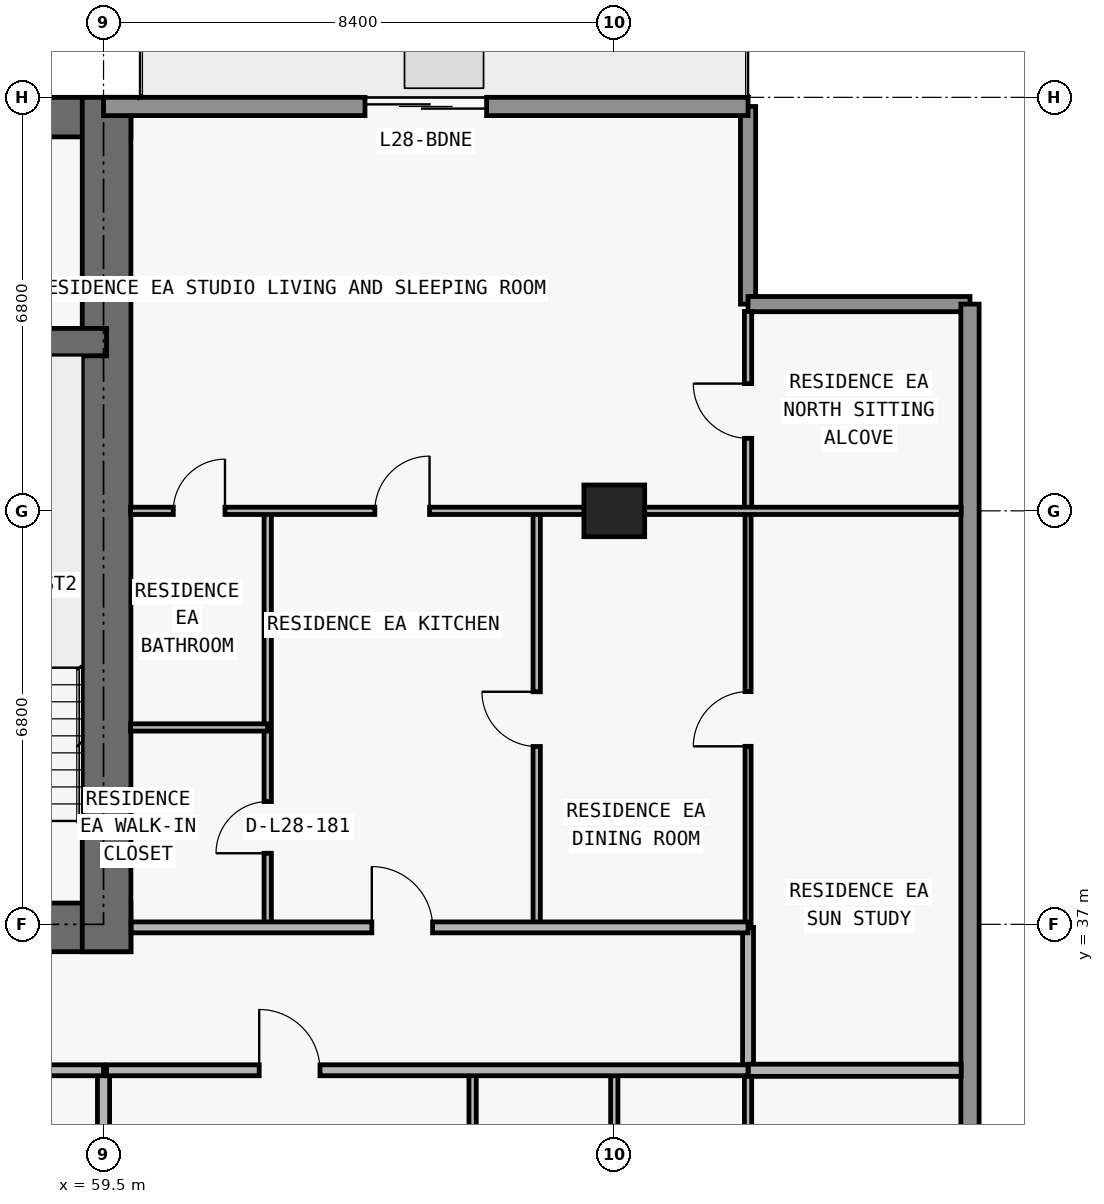
"""IFC4 building model, lengths in metres.
Left out: names, types, materials, properties, quantities, classifications, styles, units other than length and angle.
Written with IfcOpenShell. Run it as: python <this file> out.ifc"""

import sys

from ifc_helpers import new_model, si_unit, direction, frame, frame_2d, origin, origin_2d, place, context, subcontext, project, spatial, rectangle, extrude, element, fill, save


model = new_model("IFC4")
c1 = context("Model", 3, precision=1e-05, world=origin(), true_north=direction((0.0, 1.0)))
c2 = subcontext(c1, "Body", "Model", "MODEL_VIEW")
j1 = project(units=[si_unit("LENGTHUNIT", "METRE"), si_unit("PLANEANGLEUNIT", "RADIAN")], contexts=[c1])
p1 = place(None, origin())
s1 = spatial("IfcSite", under=j1, at=p1, CompositionType="ELEMENT")
p2 = place(p1, origin())
s2 = spatial("IfcBuilding", under=s1, at=p2, CompositionType="ELEMENT")
p3 = place(p2, frame((0.0, 0.0, 105.9)))
s3 = spatial("IfcBuildingStorey", under=s2, at=p3, CompositionType="ELEMENT", Elevation=105.9)
p4 = place(p3, frame((67.9, 43.8, 0.0), z_axis=(0.0, 0.0, 1.0), x_axis=(1.0, 0.0, 0.0)))
e1 = element("IfcColumn", 1, at=p4, inside=s3, PredefinedType="COLUMN", context=c2, shape_type="SweptSolid", body=[
    extrude(rectangle(XDim=1.0, YDim=0.85, at=origin_2d()), origin(), (0.0, 0.0, 1.0), 3.05),
])
p5 = place(p3, frame((17.85, 36.95, 0.0), z_axis=(0.0, 0.0, 1.0), x_axis=(1.0, 0.0, 0.0)))
e2 = element("IfcWall", 2, at=p5, inside=s3, PredefinedType="SHEAR", context=c2, shape_type="SweptSolid", body=[
    extrude(rectangle(XDim=42.1, YDim=0.8, at=frame_2d((21.05, 0.0))), origin(), (0.0, 0.0, 1.0), 3.05),
])
p6 = place(p5, frame((14.45, 0.0, 0.0)))
e3 = element("IfcOpeningElement", 3, at=p6, cuts=e2, PredefinedType="OPENING", context=c2, shape_type="SweptSolid", body=[
    extrude(rectangle(XDim=1.1, YDim=2.15, at=frame_2d((0.55, 1.075))), frame((0.0, 0.41, 0.0), z_axis=(0.0, -1.0, 0.0), x_axis=(1.0, 0.0, 0.0)), (0.0, 0.0, 1.0), 0.82),
])
p7 = place(p5, frame((6.3, 0.0, 0.0)))
e4 = element("IfcOpeningElement", 4, at=p7, cuts=e2, PredefinedType="OPENING", context=c2, shape_type="SweptSolid", body=[
    extrude(rectangle(XDim=1.05, YDim=2.15, at=frame_2d((0.525, 1.075))), frame((0.0, 0.41, 0.0), z_axis=(0.0, -1.0, 0.0), x_axis=(1.0, 0.0, 0.0)), (0.0, 0.0, 1.0), 0.82),
])
p8 = place(p5, frame((34.8, 0.0, 0.0)))
e5 = element("IfcOpeningElement", 5, at=p8, cuts=e2, PredefinedType="OPENING", context=c2, shape_type="SweptSolid", body=[
    extrude(rectangle(XDim=1.05, YDim=2.15, at=frame_2d((0.525, 1.075))), frame((0.0, 0.41, 0.0), z_axis=(0.0, -1.0, 0.0), x_axis=(1.0, 0.0, 0.0)), (0.0, 0.0, 1.0), 0.82),
])
p9 = place(p5, frame((10.913, 0.0, 0.0)))
e6 = element("IfcOpeningElement", 6, at=p9, cuts=e2, PredefinedType="OPENING", context=c2, shape_type="SweptSolid", body=[
    extrude(rectangle(XDim=1.05, YDim=2.15, at=frame_2d((0.525, 1.075))), frame((0.0, 0.41, 0.0), z_axis=(0.0, -1.0, 0.0), x_axis=(1.0, 0.0, 0.0)), (0.0, 0.0, 1.0), 0.82),
])
p10 = place(p5, frame((24.15, 0.0, 0.0)))
e7 = element("IfcOpeningElement", 7, at=p10, cuts=e2, PredefinedType="OPENING", context=c2, shape_type="SweptSolid", body=[
    extrude(rectangle(XDim=1.05, YDim=2.15, at=frame_2d((0.525, 1.075))), frame((0.0, 0.41, 0.0), z_axis=(0.0, -1.0, 0.0), x_axis=(1.0, 0.0, 0.0)), (0.0, 0.0, 1.0), 0.82),
])
p11 = place(p3, frame((17.85, 50.275, 0.0), z_axis=(0.0, 0.0, 1.0), x_axis=(1.0, 0.0, 0.0)))
e8 = element("IfcWall", 8, at=p11, inside=s3, PredefinedType="SHEAR", context=c2, shape_type="SweptSolid", body=[
    extrude(rectangle(XDim=42.1, YDim=0.65, at=frame_2d((21.05, 0.0))), origin(), (0.0, 0.0, 1.0), 3.05),
])
p12 = place(p3, frame((59.55, 36.55, 0.0), z_axis=(0.0, 0.0, 1.0), x_axis=(0.0, 1.0, 0.0)))
e9 = element("IfcWall", 9, at=p12, inside=s3, PredefinedType="SHEAR", context=c2, shape_type="SweptSolid", body=[
    extrude(rectangle(XDim=14.05, YDim=0.8, at=frame_2d((7.025, 0.0))), origin(), (0.0, 0.0, 1.0), 3.05),
])
p13 = place(p3, frame((18.25, 46.575, 0.0), z_axis=(0.0, 0.0, 1.0), x_axis=(1.0, 0.0, 0.0)))
e10 = element("IfcWall", 10, at=p13, inside=s3, PredefinedType="SHEAR", context=c2, shape_type="SweptSolid", body=[
    extrude(rectangle(XDim=41.3, YDim=0.45, at=frame_2d((20.65, 0.0))), origin(), (0.0, 0.0, 1.0), 3.05),
])
p14 = place(p13, frame((7.625, 0.0, 0.0)))
e11 = element("IfcOpeningElement", 11, at=p14, cuts=e10, PredefinedType="OPENING", context=c2, shape_type="SweptSolid", body=[
    extrude(rectangle(XDim=1.05, YDim=2.15, at=frame_2d((0.525, 1.075))), frame((0.0, 0.235, 0.0), z_axis=(0.0, -1.0, 0.0), x_axis=(1.0, 0.0, 0.0)), (0.0, 0.0, 1.0), 0.47),
])
p15 = place(p13, frame((32.675, 0.0, 0.0)))
e12 = element("IfcOpeningElement", 12, at=p15, cuts=e10, PredefinedType="OPENING", context=c2, shape_type="SweptSolid", body=[
    extrude(rectangle(XDim=1.05, YDim=2.15, at=frame_2d((0.525, 1.075))), frame((0.0, 0.235, 0.0), z_axis=(0.0, -1.0, 0.0), x_axis=(1.0, 0.0, 0.0)), (0.0, 0.0, 1.0), 0.47),
])
p16 = place(p3, frame((70.1, 50.45, 0.0), z_axis=(0.0, 0.0, 1.0), x_axis=(0.0, -1.0, 0.0)))
e13 = element("IfcWall", 13, at=p16, inside=s3, PredefinedType="ELEMENTEDWALL", context=c2, shape_type="SweptSolid", body=[
    extrude(rectangle(XDim=3.25, YDim=0.25, at=frame_2d((1.625, 0.0))), origin(), (0.0, 0.0, 1.0), 3.05),
])
p17 = place(p3, frame((70.1, 47.2, 0.0), z_axis=(0.0, 0.0, 1.0), x_axis=(1.0, 0.0, 0.0)))
e14 = element("IfcWall", 14, at=p17, inside=s3, PredefinedType="ELEMENTEDWALL", context=c2, shape_type="SweptSolid", body=[
    extrude(rectangle(XDim=3.65, YDim=0.25, at=frame_2d((1.825, 0.0))), origin(), (0.0, 0.0, 1.0), 3.05),
])
p18 = place(p3, frame((73.75, 47.2, 0.0), z_axis=(0.0, 0.0, 1.0), x_axis=(0.0, -1.0, 0.0)))
e15 = element("IfcWall", 15, at=p18, inside=s3, PredefinedType="STANDARD", context=c2, shape_type="SweptSolid", body=[
    extrude(rectangle(XDim=19.2, YDim=0.3, at=frame_2d((9.6, 0.0))), origin(), (0.0, 0.0, 1.0), 3.05),
])
p19 = place(p3, frame((59.5, 50.45, 0.0), z_axis=(0.0, 0.0, 1.0), x_axis=(1.0, 0.0, 0.0)))
e16 = element("IfcWall", 16, at=p19, inside=s3, PredefinedType="STANDARD", context=c2, shape_type="SweptSolid", body=[
    extrude(rectangle(XDim=10.6, YDim=0.3, at=frame_2d((5.3, 0.0))), origin(), (0.0, 0.0, 1.0), 3.05),
])
p20 = place(p19, frame((4.3, 0.0, 0.0)))
e17 = element("IfcOpeningElement", 17, at=p20, cuts=e16, PredefinedType="OPENING", context=c2, shape_type="SweptSolid", body=[
    extrude(rectangle(XDim=2.0, YDim=2.3, at=frame_2d((1.0, 1.15))), frame((0.0, 0.16, 0.0), z_axis=(0.0, -1.0, 0.0), x_axis=(1.0, 0.0, 0.0)), (0.0, 0.0, 1.0), 0.32),
])
p21 = place(p3, frame((59.5, 30.24, 0.0), z_axis=(0.0, 0.0, 1.0), x_axis=(0.0, 1.0, 0.0)))
e18 = element("IfcWall", 18, at=p21, inside=s3, PredefinedType="PARTITIONING", context=c2, shape_type="SweptSolid", body=[
    extrude(rectangle(XDim=4.36, YDim=0.2, at=frame_2d((2.18, 0.0))), origin(), (0.0, 0.0, 1.0), 2.174),
])
p22 = place(p3, frame((62.2, 36.95, 0.0), z_axis=(0.0, 0.0, 1.0), x_axis=(0.0, 1.0, 0.0)))
e19 = element("IfcWall", 19, at=p22, inside=s3, PredefinedType="PARTITIONING", context=c2, shape_type="SweptSolid", body=[
    extrude(rectangle(XDim=6.85, YDim=0.12, at=frame_2d((3.425, 0.0))), origin(), (0.0, 0.0, 1.0), 2.499),
])
p23 = place(p22, frame((1.219, 0.0, 0.0)))
e20 = element("IfcOpeningElement", 20, at=p23, cuts=e19, PredefinedType="OPENING", context=c2, shape_type="SweptSolid", body=[
    extrude(rectangle(XDim=0.85, YDim=2.1, at=frame_2d((0.425, 1.05))), frame((0.0, 0.07, 0.0), z_axis=(0.0, -1.0, 0.0), x_axis=(1.0, 0.0, 0.0)), (0.0, 0.0, 1.0), 0.14),
])
p24 = place(p3, frame((65.57, 30.24, 0.0), z_axis=(0.0, 0.0, 1.0), x_axis=(0.0, 1.0, 0.0)))
e21 = element("IfcWall", 21, at=p24, inside=s3, PredefinedType="PARTITIONING", context=c2, shape_type="SweptSolid", body=[
    extrude(rectangle(XDim=4.36, YDim=0.12, at=frame_2d((2.18, 0.0))), origin(), (0.0, 0.0, 1.0), 3.05),
])
p25 = place(p24, frame((1.755, 0.0, 0.0)))
e22 = element("IfcOpeningElement", 22, at=p25, cuts=e21, PredefinedType="OPENING", context=c2, shape_type="SweptSolid", body=[
    extrude(rectangle(XDim=0.85, YDim=2.1, at=frame_2d((0.425, 1.05))), frame((0.0, 0.07, 0.0), z_axis=(0.0, -1.0, 0.0), x_axis=(1.0, 0.0, 0.0)), (0.0, 0.0, 1.0), 0.14),
])
p26 = place(p3, frame((66.624, 36.95, 0.0), z_axis=(0.0, 0.0, 1.0), x_axis=(0.0, 1.0, 0.0)))
e23 = element("IfcWall", 23, at=p26, inside=s3, PredefinedType="PARTITIONING", context=c2, shape_type="SweptSolid", body=[
    extrude(rectangle(XDim=6.85, YDim=0.12, at=frame_2d((3.425, 0.0))), origin(), (0.0, 0.0, 1.0), 3.05),
])
p27 = place(p26, frame((2.975, 0.0, 0.0)))
e24 = element("IfcOpeningElement", 24, at=p27, cuts=e23, PredefinedType="OPENING", context=c2, shape_type="SweptSolid", body=[
    extrude(rectangle(XDim=0.9, YDim=2.15, at=frame_2d((0.45, 1.075))), frame((0.0, 0.07, 0.0), z_axis=(0.0, -1.0, 0.0), x_axis=(1.0, 0.0, 0.0)), (0.0, 0.0, 1.0), 0.14),
])
p28 = place(p3, frame((67.9, 30.24, 0.0), z_axis=(0.0, 0.0, 1.0), x_axis=(0.0, 1.0, 0.0)))
e25 = element("IfcWall", 25, at=p28, inside=s3, PredefinedType="PARTITIONING", context=c2, shape_type="SweptSolid", body=[
    extrude(rectangle(XDim=4.36, YDim=0.12, at=frame_2d((2.18, 0.0))), origin(), (0.0, 0.0, 1.0), 2.174),
])
p29 = place(p3, frame((70.1, 30.24, 0.0), z_axis=(0.0, 0.0, 1.0), x_axis=(0.0, 1.0, 0.0)))
e26 = element("IfcWall", 26, at=p29, inside=s3, PredefinedType="PARTITIONING", context=c2, shape_type="SweptSolid", body=[
    extrude(rectangle(XDim=4.36, YDim=0.12, at=frame_2d((2.18, 0.0))), origin(), (0.0, 0.0, 1.0), 3.05),
])
p30 = place(p3, frame((70.1, 34.605, 0.0), z_axis=(0.0, 0.0, 1.0), x_axis=(0.0, 1.0, 0.0)))
e27 = element("IfcWall", 27, at=p30, inside=s3, PredefinedType="PARTITIONING", context=c2, shape_type="SweptSolid", body=[
    extrude(rectangle(XDim=2.345, YDim=0.18, at=frame_2d((1.172, 0.0))), origin(), (0.0, 0.0, 1.0), 3.05),
])
p31 = place(p3, frame((70.1, 36.955, 0.0), z_axis=(0.0, 0.0, 1.0), x_axis=(0.0, 1.0, 0.0)))
e28 = element("IfcWall", 28, at=p31, inside=s3, PredefinedType="MOVABLE", context=c2, shape_type="SweptSolid", body=[
    extrude(rectangle(XDim=6.845, YDim=0.1, at=frame_2d((3.422, 0.0))), origin(), (0.0, 0.0, 1.0), 3.05),
])
p32 = place(p31, frame((2.972, 0.0, 0.0)))
e29 = element("IfcOpeningElement", 29, at=p32, cuts=e28, PredefinedType="OPENING", context=c2, shape_type="SweptSolid", body=[
    extrude(rectangle(XDim=0.9, YDim=2.15, at=frame_2d((0.45, 1.075))), frame((0.0, 0.06, 0.0), z_axis=(0.0, -1.0, 0.0), x_axis=(1.0, 0.0, 0.0)), (0.0, 0.0, 1.0), 0.12),
])
p33 = place(p3, frame((70.1, 43.805, 0.0), z_axis=(0.0, 0.0, 1.0), x_axis=(0.0, 1.0, 0.0)))
e30 = element("IfcWall", 30, at=p33, inside=s3, PredefinedType="PARTITIONING", context=c2, shape_type="SweptSolid", body=[
    extrude(rectangle(XDim=3.275, YDim=0.12, at=frame_2d((1.638, 0.0))), origin(), (0.0, 0.0, 1.0), 3.05),
])
p34 = place(p33, frame((1.188, 0.0, 0.0)))
e31 = element("IfcOpeningElement", 31, at=p34, cuts=e30, PredefinedType="OPENING", context=c2, shape_type="SweptSolid", body=[
    extrude(rectangle(XDim=0.9, YDim=2.15, at=frame_2d((0.45, 1.075))), frame((0.0, 0.07, 0.0), z_axis=(0.0, -1.0, 0.0), x_axis=(1.0, 0.0, 0.0)), (0.0, 0.0, 1.0), 0.14),
])
p35 = place(p3, frame((26.7, 34.6, 0.0), z_axis=(0.0, 0.0, 1.0), x_axis=(1.0, 0.0, 0.0)))
e32 = element("IfcWall", 32, at=p35, inside=s3, PredefinedType="PARTITIONING", context=c2, shape_type="SweptSolid", body=[
    extrude(rectangle(XDim=32.8, YDim=0.18, at=frame_2d((16.4, 0.0))), origin(), (0.0, 0.0, 1.0), 3.05),
])
p36 = place(p35, frame((2.812, 0.0, 0.0)))
e33 = element("IfcOpeningElement", 33, at=p36, cuts=e32, PredefinedType="OPENING", context=c2, shape_type="SweptSolid", body=[
    extrude(rectangle(XDim=1.0, YDim=2.2, at=frame_2d((0.5, 1.1))), frame((0.0, 0.1, 0.0), z_axis=(0.0, -1.0, 0.0), x_axis=(1.0, 0.0, 0.0)), (0.0, 0.0, 1.0), 0.2),
])
p37 = place(p35, frame((27.104, 0.0, 0.0)))
e34 = element("IfcOpeningElement", 34, at=p37, cuts=e32, PredefinedType="OPENING", context=c2, shape_type="SweptSolid", body=[
    extrude(rectangle(XDim=1.0, YDim=2.2, at=frame_2d((0.5, 1.1))), frame((0.0, 0.1, 0.0), z_axis=(0.0, -1.0, 0.0), x_axis=(1.0, 0.0, 0.0)), (0.0, 0.0, 1.0), 0.2),
])
p38 = place(p3, frame((59.55, 34.6, 0.0), z_axis=(0.0, 0.0, 1.0), x_axis=(1.0, 0.0, 0.0)))
e35 = element("IfcWall", 35, at=p38, inside=s3, PredefinedType="PARTITIONING", context=c2, shape_type="SweptSolid", body=[
    extrude(rectangle(XDim=10.55, YDim=0.18, at=frame_2d((5.275, 0.0))), origin(), (0.0, 0.0, 1.0), 3.05),
])
p39 = place(p38, frame((2.51, 0.0, 0.0)))
e36 = element("IfcOpeningElement", 36, at=p39, cuts=e35, PredefinedType="OPENING", context=c2, shape_type="SweptSolid", body=[
    extrude(rectangle(XDim=1.0, YDim=2.2, at=frame_2d((0.5, 1.1))), frame((0.0, 0.1, 0.0), z_axis=(0.0, -1.0, 0.0), x_axis=(1.0, 0.0, 0.0)), (0.0, 0.0, 1.0), 0.2),
])
p40 = place(p3, frame((70.105, 34.6, 0.0), z_axis=(0.0, 0.0, 1.0), x_axis=(1.0, 0.0, 0.0)))
e37 = element("IfcWall", 37, at=p40, inside=s3, PredefinedType="PARTITIONING", context=c2, shape_type="SweptSolid", body=[
    extrude(rectangle(XDim=3.5, YDim=0.2, at=frame_2d((1.75, 0.0))), origin(), (0.0, 0.0, 1.0), 3.05),
])
p41 = place(p3, frame((59.955, 36.95, 0.0), z_axis=(0.0, 0.0, 1.0), x_axis=(1.0, 0.0, 0.0)))
e38 = element("IfcWall", 38, at=p41, inside=s3, PredefinedType="PARTITIONING", context=c2, shape_type="SweptSolid", body=[
    extrude(rectangle(XDim=10.145, YDim=0.18, at=frame_2d((5.073, 0.0))), origin(), (0.0, 0.0, 1.0), 3.05),
])
p42 = place(p41, frame((3.957, 0.0, 0.0)))
e39 = element("IfcOpeningElement", 39, at=p42, cuts=e38, PredefinedType="OPENING", context=c2, shape_type="SweptSolid", body=[
    extrude(rectangle(XDim=1.0, YDim=2.2, at=frame_2d((0.5, 1.1))), frame((0.0, 0.1, 0.0), z_axis=(0.0, -1.0, 0.0), x_axis=(1.0, 0.0, 0.0)), (0.0, 0.0, 1.0), 0.2),
])
p43 = place(p3, frame((59.945, 40.238, 0.0), z_axis=(0.0, 0.0, 1.0), x_axis=(1.0, 0.0, 0.0)))
e40 = element("IfcWall", 40, at=p43, inside=s3, PredefinedType="PARTITIONING", context=c2, shape_type="SweptSolid", body=[
    extrude(rectangle(XDim=2.255, YDim=0.12, at=frame_2d((1.127, 0.0))), origin(), (0.0, 0.0, 1.0), 3.05),
])
p44 = place(p3, frame((59.945, 43.8, 0.0), z_axis=(0.0, 0.0, 1.0), x_axis=(1.0, 0.0, 0.0)))
e41 = element("IfcWall", 41, at=p44, inside=s3, PredefinedType="PARTITIONING", context=c2, shape_type="SweptSolid", body=[
    extrude(rectangle(XDim=13.66, YDim=0.12, at=frame_2d((6.83, 0.0))), origin(), (0.0, 0.0, 1.0), 2.339),
])
p45 = place(p44, frame((4.017, 0.0, 0.0)))
e42 = element("IfcOpeningElement", 42, at=p45, cuts=e41, PredefinedType="OPENING", context=c2, shape_type="SweptSolid", body=[
    extrude(rectangle(XDim=0.9, YDim=2.15, at=frame_2d((0.45, 1.075))), frame((0.0, 0.07, 0.0), z_axis=(0.0, -1.0, 0.0), x_axis=(1.0, 0.0, 0.0)), (0.0, 0.0, 1.0), 0.14),
])
p46 = place(p44, frame((0.702, 0.0, 0.0)))
e43 = element("IfcOpeningElement", 43, at=p46, cuts=e41, PredefinedType="OPENING", context=c2, shape_type="SweptSolid", body=[
    extrude(rectangle(XDim=0.85, YDim=2.1, at=frame_2d((0.425, 1.05))), frame((0.0, 0.07, 0.0), z_axis=(0.0, -1.0, 0.0), x_axis=(1.0, 0.0, 0.0)), (0.0, 0.0, 1.0), 0.14),
])
p47 = place(p20, origin())
e44 = element("IfcDoor", 44, at=p47, inside=s3, OperationType="DOUBLE_DOOR_SLIDING", PredefinedType="DOOR", context=c2, shape_type="SweptSolid", body=[
    extrude(rectangle(XDim=2.0, YDim=2.3, at=frame_2d((1.0, 1.15))), frame((0.0, 0.025, 0.0), z_axis=(0.0, -1.0, 0.0), x_axis=(1.0, 0.0, 0.0)), (0.0, 0.0, 1.0), 0.05),
])
fill(e17, e44)
p48 = place(p39, origin())
e45 = element("IfcDoor", 45, at=p48, inside=s3, OperationType="SINGLE_SWING_LEFT", PredefinedType="DOOR", context=c2, shape_type="SweptSolid", body=[
    extrude(rectangle(XDim=1.0, YDim=2.2, at=frame_2d((0.5, 1.1))), frame((0.0, 0.025, 0.0), z_axis=(0.0, -1.0, 0.0), x_axis=(1.0, 0.0, 0.0)), (0.0, 0.0, 1.0), 0.05),
])
fill(e36, e45)
p49 = place(p27, origin())
e46 = element("IfcDoor", 46, at=p49, inside=s3, OperationType="SINGLE_SWING_RIGHT", PredefinedType="DOOR", context=c2, shape_type="SweptSolid", body=[
    extrude(rectangle(XDim=0.9, YDim=2.15, at=frame_2d((0.45, 1.075))), frame((0.0, 0.025, 0.0), z_axis=(0.0, -1.0, 0.0), x_axis=(1.0, 0.0, 0.0)), (0.0, 0.0, 1.0), 0.05),
])
fill(e24, e46)
p50 = place(p42, origin())
e47 = element("IfcDoor", 47, at=p50, inside=s3, OperationType="SINGLE_SWING_LEFT", PredefinedType="DOOR", context=c2, shape_type="SweptSolid", body=[
    extrude(rectangle(XDim=1.0, YDim=2.2, at=frame_2d((0.5, 1.1))), frame((0.0, 0.025, 0.0), z_axis=(0.0, -1.0, 0.0), x_axis=(1.0, 0.0, 0.0)), (0.0, 0.0, 1.0), 0.05),
])
fill(e39, e47)
p51 = place(p45, origin())
e48 = element("IfcDoor", 48, at=p51, inside=s3, OperationType="SINGLE_SWING_RIGHT", PredefinedType="DOOR", context=c2, shape_type="SweptSolid", body=[
    extrude(rectangle(XDim=0.9, YDim=2.15, at=frame_2d((0.45, 1.075))), frame((0.0, 0.025, 0.0), z_axis=(0.0, -1.0, 0.0), x_axis=(1.0, 0.0, 0.0)), (0.0, 0.0, 1.0), 0.05),
])
fill(e42, e48)
p52 = place(p23, origin())
e49 = element("IfcDoor", 49, at=p52, inside=s3, OperationType="SINGLE_SWING_LEFT", PredefinedType="DOOR", context=c2, shape_type="SweptSolid", body=[
    extrude(rectangle(XDim=0.85, YDim=2.1, at=frame_2d((0.425, 1.05))), frame((0.0, 0.025, 0.0), z_axis=(0.0, -1.0, 0.0), x_axis=(1.0, 0.0, 0.0)), (0.0, 0.0, 1.0), 0.05),
])
fill(e20, e49)
p53 = place(p46, origin())
e50 = element("IfcDoor", 50, at=p53, inside=s3, OperationType="SINGLE_SWING_RIGHT", PredefinedType="DOOR", context=c2, shape_type="SweptSolid", body=[
    extrude(rectangle(XDim=0.85, YDim=2.1, at=frame_2d((0.425, 1.05))), frame((0.0, 0.025, 0.0), z_axis=(0.0, -1.0, 0.0), x_axis=(1.0, 0.0, 0.0)), (0.0, 0.0, 1.0), 0.05),
])
fill(e43, e50)
p54 = place(p32, origin())
e51 = element("IfcDoor", 51, at=p54, inside=s3, OperationType="SINGLE_SWING_LEFT", PredefinedType="DOOR", context=c2, shape_type="SweptSolid", body=[
    extrude(rectangle(XDim=0.9, YDim=2.15, at=frame_2d((0.45, 1.075))), frame((0.0, 0.025, 0.0), z_axis=(0.0, -1.0, 0.0), x_axis=(1.0, 0.0, 0.0)), (0.0, 0.0, 1.0), 0.05),
])
fill(e29, e51)
p55 = place(p34, origin())
e52 = element("IfcDoor", 52, at=p55, inside=s3, OperationType="SINGLE_SWING_RIGHT", PredefinedType="DOOR", context=c2, shape_type="SweptSolid", body=[
    extrude(rectangle(XDim=0.9, YDim=2.15, at=frame_2d((0.45, 1.075))), frame((0.0, 0.025, 0.0), z_axis=(0.0, -1.0, 0.0), x_axis=(1.0, 0.0, 0.0)), (0.0, 0.0, 1.0), 0.05),
])
fill(e31, e52)
save(model, sys.argv[1])
